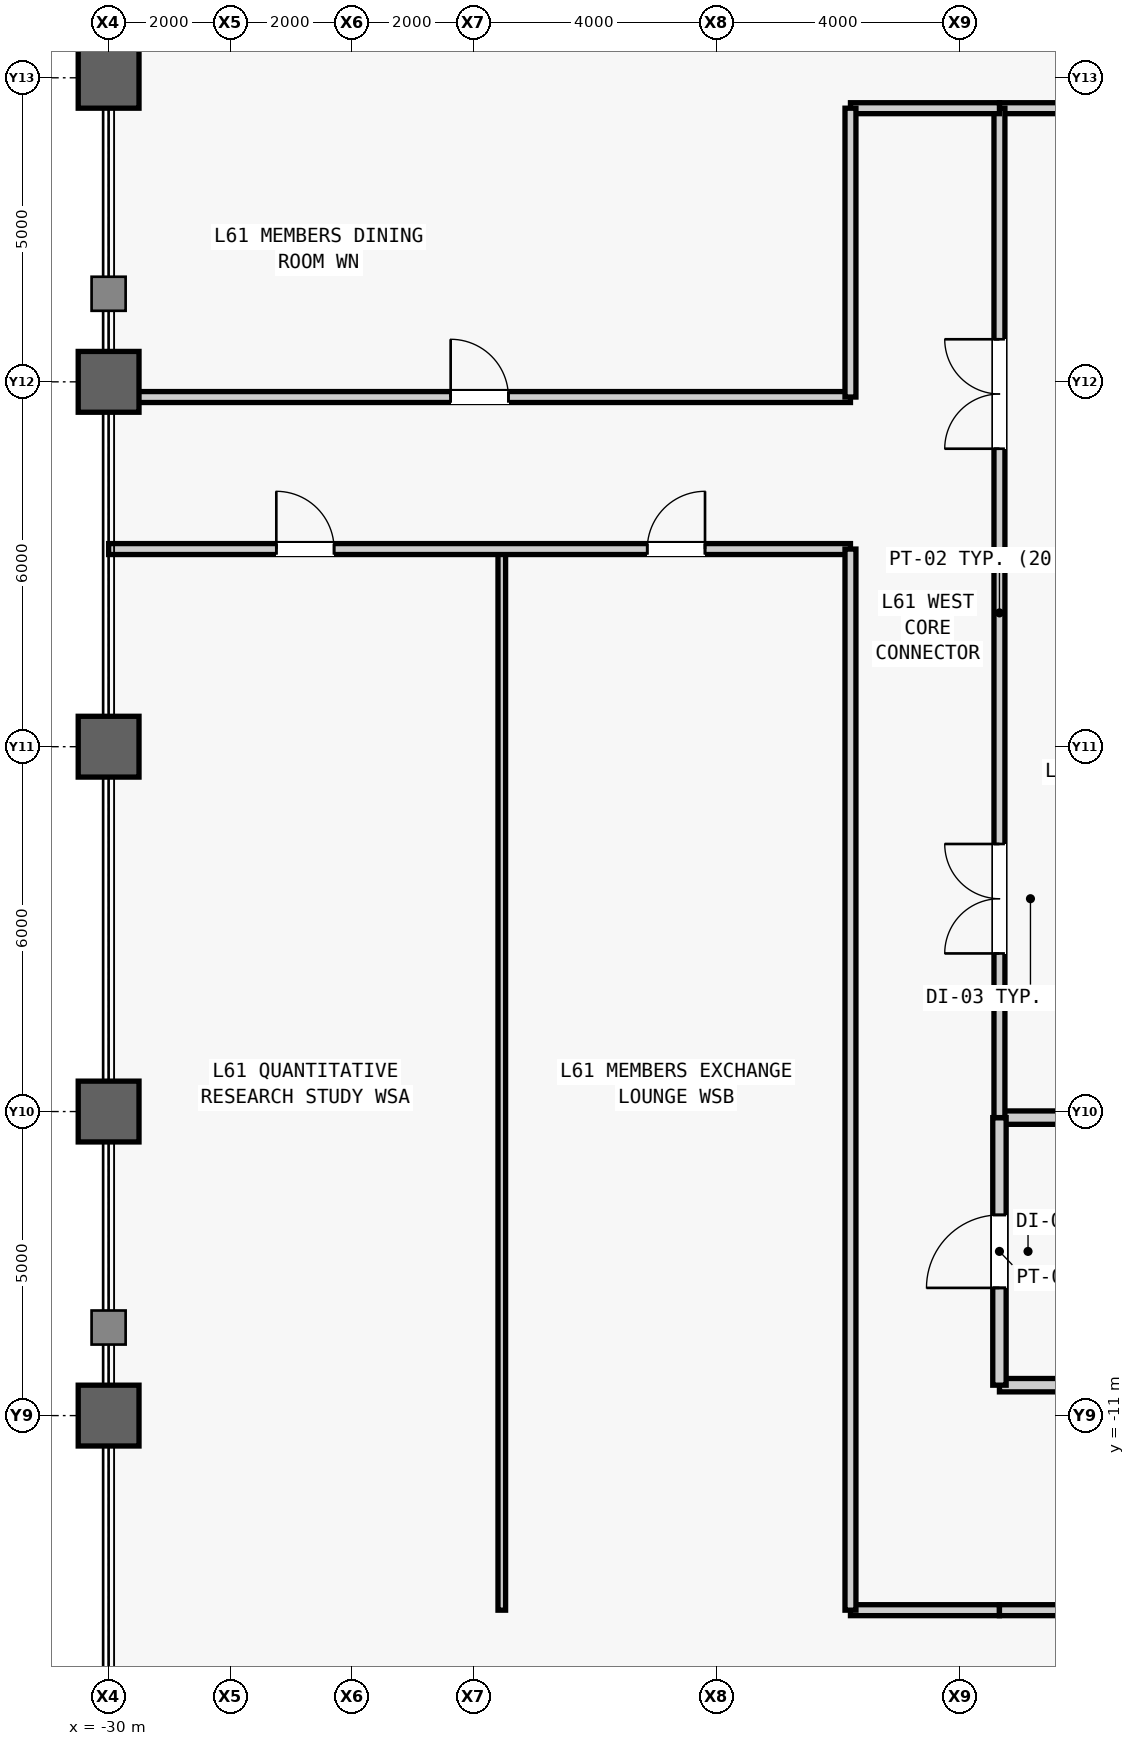
"""IFC4 building model, lengths in metres.
Left out: names, types, materials, properties, quantities, classifications, styles, units other than length and angle.
Written with IfcOpenShell. Run it as: python <this file> out.ifc"""

import sys

from ifc_helpers import new_model, si_unit, direction, frame, frame_2d, origin, origin_2d, place, context, subcontext, project, spatial, rectangle, hollow_rectangle, extrude, source, transform, mapped, element, fill, save


model = new_model("IFC4")
c1 = context("Model", 3, precision=1e-05, world=origin(), true_north=direction((0.0, 1.0)))
c2 = subcontext(c1, "Body", "Model", "MODEL_VIEW")
j1 = project(units=[si_unit("LENGTHUNIT", "METRE"), si_unit("PLANEANGLEUNIT", "RADIAN")], contexts=[c1])
p1 = place(None, origin())
s1 = spatial("IfcSite", under=j1, at=p1, CompositionType="ELEMENT")
p2 = place(p1, origin())
s2 = spatial("IfcBuilding", under=s1, at=p2, CompositionType="ELEMENT")
p3 = place(p2, frame((0.0, 0.0, 259.1)))
s3 = spatial("IfcBuildingStorey", under=s2, at=p3, CompositionType="ELEMENT", Elevation=259.1)
m1 = source(origin(), c2, "Body", "SweptSolid", [
    extrude(hollow_rectangle(XDim=1.0, YDim=1.0, WallThickness=0.055, at=origin_2d()), origin(), (0.0, 0.0, 1.0), 4.0),
])
for number, where, z_axis, x_axis in (
    (1, (-30.0, -11.0, 0.0), (0.0, 0.0, 1.0), (1.0, 0.0, 0.0)),
    (2, (-30.0, -6.0, 0.0), (0.0, 0.0, 1.0), (1.0, 0.0, 0.0)),
    (3, (-30.0, 0.0, 0.0), (0.0, 0.0, 1.0), (1.0, 0.0, 0.0)),
    (4, (-30.0, 6.0, 0.0), (0.0, 0.0, 1.0), (1.0, 0.0, 0.0)),
    (5, (-30.0, 11.0, 0.0), (0.0, 0.0, 1.0), (1.0, 0.0, 0.0)),
):
    element("IfcColumn", number, at=place(p3, frame(where, z_axis=z_axis, x_axis=x_axis)), inside=s3, PredefinedType="COLUMN", context=c2, shape_type="MappedRepresentation", body=[
        mapped(m1, transform((0.0, 0.0, 0.0), scale=1.0)),
    ])
m2 = source(origin(), c2, "Body", "SweptSolid", [
    extrude(rectangle(XDim=4.05, YDim=0.22, at=frame_2d((2.025, 0.0))), origin(), (0.0, 0.0, 1.0), 3.78),
])
p4 = place(p3, frame((-15.35, -10.5, 0.0), z_axis=(0.0, 0.0, 1.0), x_axis=(1.0, 0.0, 0.0)))
e6 = element("IfcWall", 6, at=p4, inside=s3, PredefinedType="PARTITIONING", context=c2, shape_type="MappedRepresentation", body=[
    mapped(m2, transform((0.0, 0.0, 0.0), scale=1.0)),
])
m3 = source(origin(), c2, "Body", "SweptSolid", [
    extrude(rectangle(XDim=4.05, YDim=0.22, at=frame_2d((2.025, 0.0))), origin(), (0.0, 0.0, 1.0), 3.085),
])
p5 = place(p3, frame((-15.35, -6.1, 0.0), z_axis=(0.0, 0.0, 1.0), x_axis=(1.0, 0.0, 0.0)))
e7 = element("IfcWall", 7, at=p5, inside=s3, PredefinedType="PARTITIONING", context=c2, shape_type="MappedRepresentation", body=[
    mapped(m3, transform((0.0, 0.0, 0.0), scale=1.0)),
])
m4 = source(origin(), c2, "Body", "SweptSolid", [
    extrude(rectangle(XDim=4.4, YDim=0.22, at=frame_2d((2.2, 0.0))), origin(), (0.0, 0.0, 1.0), 3.78),
])
p6 = place(p3, frame((-15.35, -10.5, 0.0), z_axis=(0.0, 0.0, 1.0), x_axis=(0.0, 1.0, 0.0)))
e8 = element("IfcWall", 8, at=p6, inside=s3, PredefinedType="PARTITIONING", context=c2, shape_type="MappedRepresentation", body=[
    mapped(m4, transform((0.0, 0.0, 0.0), scale=1.0)),
])
m5 = source(origin(), c2, "Body", "SweptSolid", [
    extrude(rectangle(XDim=1.2, YDim=2.2, at=frame_2d((0.6, 1.1))), frame((0.0, 0.12, 0.0), z_axis=(0.0, -1.0, 0.0), x_axis=(1.0, 0.0, 0.0)), (0.0, 0.0, 1.0), 0.24),
])
p7 = place(p6, frame((1.6, 0.0, 0.0)))
e9 = element("IfcOpeningElement", 9, at=p7, cuts=e8, PredefinedType="OPENING", context=c2, shape_type="MappedRepresentation", body=[
    mapped(m5, transform((0.0, 0.0, 0.0), scale=1.0)),
])
m6 = source(origin(), c2, "Body", "SweptSolid", [
    extrude(rectangle(XDim=4.05, YDim=0.18, at=frame_2d((2.025, 0.0))), origin(), (0.0, 0.0, 1.0), 3.78),
])
p8 = place(p3, frame((-15.35, 10.5, 0.0), z_axis=(0.0, 0.0, 1.0), x_axis=(1.0, 0.0, 0.0)))
e10 = element("IfcWall", 10, at=p8, inside=s3, PredefinedType="PARTITIONING", context=c2, shape_type="MappedRepresentation", body=[
    mapped(m6, transform((0.0, 0.0, 0.0), scale=1.0)),
])
m7 = source(origin(), c2, "Body", "SweptSolid", [
    extrude(rectangle(XDim=16.6, YDim=0.18, at=frame_2d((8.3, 0.0))), origin(), (0.0, 0.0, 1.0), 3.78),
])
p9 = place(p3, frame((-15.35, -6.1, 0.0), z_axis=(0.0, 0.0, 1.0), x_axis=(0.0, 1.0, 0.0)))
e11 = element("IfcWall", 11, at=p9, inside=s3, PredefinedType="PARTITIONING", context=c2, shape_type="MappedRepresentation", body=[
    mapped(m7, transform((0.0, 0.0, 0.0), scale=1.0)),
])
m8 = source(origin(), c2, "Body", "SweptSolid", [
    extrude(rectangle(XDim=1.8, YDim=2.25, at=frame_2d((0.9, 1.125))), frame((0.0, 0.1, 0.0), z_axis=(0.0, -1.0, 0.0), x_axis=(1.0, 0.0, 0.0)), (0.0, 0.0, 1.0), 0.2),
])
p10 = place(p9, frame((2.7, 0.0, 0.0)))
e12 = element("IfcOpeningElement", 12, at=p10, cuts=e11, PredefinedType="OPENING", context=c2, shape_type="MappedRepresentation", body=[
    mapped(m8, transform((0.0, 0.0, 0.0), scale=1.0)),
])
p11 = place(p9, frame((11.0, 0.0, 0.0)))
e13 = element("IfcOpeningElement", 13, at=p11, cuts=e11, PredefinedType="OPENING", context=c2, shape_type="MappedRepresentation", body=[
    mapped(m8, transform((0.0, 0.0, 0.0), scale=1.0)),
])
m9 = source(origin(), c2, "Body", "SweptSolid", [
    extrude(rectangle(XDim=2.45, YDim=0.18, at=frame_2d((1.225, 0.0))), origin(), (0.0, 0.0, 1.0), 3.78),
])
for number, where, z_axis, x_axis in (
    (14, (-17.8, 10.5, 0.0), (0.0, 0.0, 1.0), (1.0, 0.0, 0.0)),
    (15, (-17.8, -14.2, 0.0), (0.0, 0.0, 1.0), (1.0, 0.0, 0.0)),
):
    element("IfcWall", number, at=place(p3, frame(where, z_axis=z_axis, x_axis=x_axis)), inside=s3, PredefinedType="PARTITIONING", context=c2, shape_type="MappedRepresentation", body=[
        mapped(m9, transform((0.0, 0.0, 0.0), scale=1.0)),
    ])
m10 = source(origin(), c2, "Body", "SweptSolid", [
    extrude(rectangle(XDim=25.75, YDim=0.18, at=frame_2d((12.875, 0.0))), origin(), (0.0, 0.0, 1.0), 3.78),
])
p12 = place(p3, frame((-15.35, -14.2, 0.0), z_axis=(0.0, 0.0, 1.0), x_axis=(1.0, 0.0, 0.0)))
e16 = element("IfcWall", 16, at=p12, inside=s3, PredefinedType="PARTITIONING", context=c2, shape_type="MappedRepresentation", body=[
    mapped(m10, transform((0.0, 0.0, 0.0), scale=1.0)),
])
m11 = source(origin(), c2, "Body", "SweptSolid", [
    extrude(rectangle(XDim=17.45, YDim=0.125, at=frame_2d((8.725, 0.0))), origin(), (0.0, 0.0, 1.0), 3.78),
])
p13 = place(p3, frame((-23.534, -14.2, 0.0), z_axis=(0.0, 0.0, 1.0), x_axis=(0.0, 1.0, 0.0)))
e17 = element("IfcWall", 17, at=p13, inside=s3, PredefinedType="PARTITIONING", context=c2, shape_type="MappedRepresentation", body=[
    mapped(m11, transform((0.0, 0.0, 0.0), scale=1.0)),
])
m12 = source(origin(), c2, "Body", "SweptSolid", [
    extrude(rectangle(XDim=12.2, YDim=0.18, at=frame_2d((6.1, 0.0))), origin(), (0.0, 0.0, 1.0), 3.78),
])
p14 = place(p3, frame((-30.0, 3.25, 0.0), z_axis=(0.0, 0.0, 1.0), x_axis=(1.0, 0.0, 0.0)))
e18 = element("IfcWall", 18, at=p14, inside=s3, PredefinedType="PARTITIONING", context=c2, shape_type="MappedRepresentation", body=[
    mapped(m12, transform((0.0, 0.0, 0.0), scale=1.0)),
])
m13 = source(origin(), c2, "Body", "SweptSolid", [
    extrude(rectangle(XDim=0.95, YDim=2.15, at=frame_2d((0.475, 1.075))), frame((0.0, 0.1, 0.0), z_axis=(0.0, -1.0, 0.0), x_axis=(1.0, 0.0, 0.0)), (0.0, 0.0, 1.0), 0.2),
])
p15 = place(p14, frame((2.758, 0.0, 0.0)))
e19 = element("IfcOpeningElement", 19, at=p15, cuts=e18, PredefinedType="OPENING", context=c2, shape_type="MappedRepresentation", body=[
    mapped(m13, transform((0.0, 0.0, 0.0), scale=1.0)),
])
p16 = place(p14, frame((8.858, 0.0, 0.0)))
e20 = element("IfcOpeningElement", 20, at=p16, cuts=e18, PredefinedType="OPENING", context=c2, shape_type="MappedRepresentation", body=[
    mapped(m13, transform((0.0, 0.0, 0.0), scale=1.0)),
])
m14 = source(origin(), c2, "Body", "SweptSolid", [
    extrude(rectangle(XDim=17.45, YDim=0.18, at=frame_2d((8.725, 0.0))), origin(), (0.0, 0.0, 1.0), 3.78),
])
p17 = place(p3, frame((-17.8, -14.2, 0.0), z_axis=(0.0, 0.0, 1.0), x_axis=(0.0, 1.0, 0.0)))
e21 = element("IfcWall", 21, at=p17, inside=s3, PredefinedType="PARTITIONING", context=c2, shape_type="MappedRepresentation", body=[
    mapped(m14, transform((0.0, 0.0, 0.0), scale=1.0)),
])
m15 = source(origin(), c2, "Body", "SweptSolid", [
    extrude(rectangle(XDim=12.2, YDim=0.18, at=frame_2d((6.1, 0.0))), origin(), (0.0, 0.0, 1.0), 3.085),
])
p18 = place(p3, frame((-30.0, 5.75, 0.0), z_axis=(0.0, 0.0, 1.0), x_axis=(1.0, 0.0, 0.0)))
e22 = element("IfcWall", 22, at=p18, inside=s3, PredefinedType="PARTITIONING", context=c2, shape_type="MappedRepresentation", body=[
    mapped(m15, transform((0.0, 0.0, 0.0), scale=1.0)),
])
p19 = place(p18, frame((5.625, 0.0, 0.0)))
e23 = element("IfcOpeningElement", 23, at=p19, cuts=e22, PredefinedType="OPENING", context=c2, shape_type="MappedRepresentation", body=[
    mapped(m13, transform((0.0, 0.0, 0.0), scale=1.0)),
])
m16 = source(origin(), c2, "Body", "SweptSolid", [
    extrude(rectangle(XDim=4.75, YDim=0.18, at=frame_2d((2.375, 0.0))), origin(), (0.0, 0.0, 1.0), 3.78),
])
p20 = place(p3, frame((-17.8, 5.75, 0.0), z_axis=(0.0, 0.0, 1.0), x_axis=(0.0, 1.0, 0.0)))
e24 = element("IfcWall", 24, at=p20, inside=s3, PredefinedType="PARTITIONING", context=c2, shape_type="MappedRepresentation", body=[
    mapped(m16, transform((0.0, 0.0, 0.0), scale=1.0)),
])
m17 = source(origin(), c2, "Body", "SweptSolid", [
    extrude(rectangle(XDim=1.2, YDim=2.2, at=frame_2d((0.6, 1.1))), frame((0.0, 0.025, 0.0), z_axis=(0.0, -1.0, 0.0), x_axis=(1.0, 0.0, 0.0)), (0.0, 0.0, 1.0), 0.05),
])
p21 = place(p7, origin())
e25 = element("IfcDoor", 25, at=p21, inside=s3, OperationType="SINGLE_SWING_LEFT", PredefinedType="DOOR", context=c2, shape_type="MappedRepresentation", body=[
    mapped(m17, transform((0.0, 0.0, 0.0), scale=1.0)),
])
fill(e9, e25)
m18 = source(origin(), c2, "Body", "SweptSolid", [
    extrude(rectangle(XDim=1.8, YDim=2.25, at=frame_2d((0.9, 1.125))), frame((0.0, 0.025, 0.0), z_axis=(0.0, -1.0, 0.0), x_axis=(1.0, 0.0, 0.0)), (0.0, 0.0, 1.0), 0.05),
])
p22 = place(p10, origin())
e26 = element("IfcDoor", 26, at=p22, inside=s3, OperationType="SINGLE_SWING_LEFT", PredefinedType="DOOR", context=c2, shape_type="MappedRepresentation", body=[
    mapped(m18, transform((0.0, 0.0, 0.0), scale=1.0)),
])
fill(e12, e26)
p23 = place(p11, origin())
e27 = element("IfcDoor", 27, at=p23, inside=s3, OperationType="SINGLE_SWING_RIGHT", PredefinedType="DOOR", context=c2, shape_type="MappedRepresentation", body=[
    mapped(m18, transform((0.0, 0.0, 0.0), scale=1.0)),
])
fill(e13, e27)
m19 = source(origin(), c2, "Body", "SweptSolid", [
    extrude(rectangle(XDim=0.95, YDim=2.15, at=frame_2d((0.475, 1.075))), frame((0.0, 0.025, 0.0), z_axis=(0.0, -1.0, 0.0), x_axis=(1.0, 0.0, 0.0)), (0.0, 0.0, 1.0), 0.05),
])
p24 = place(p15, origin())
e28 = element("IfcDoor", 28, at=p24, inside=s3, OperationType="SINGLE_SWING_LEFT", PredefinedType="DOOR", context=c2, shape_type="MappedRepresentation", body=[
    mapped(m19, transform((0.0, 0.0, 0.0), scale=1.0)),
])
fill(e19, e28)
p25 = place(p16, origin())
e29 = element("IfcDoor", 29, at=p25, inside=s3, OperationType="SINGLE_SWING_RIGHT", PredefinedType="DOOR", context=c2, shape_type="MappedRepresentation", body=[
    mapped(m19, transform((0.0, 0.0, 0.0), scale=1.0)),
])
fill(e20, e29)
p26 = place(p19, origin())
e30 = element("IfcDoor", 30, at=p26, inside=s3, OperationType="SINGLE_SWING_LEFT", PredefinedType="DOOR", context=c2, shape_type="MappedRepresentation", body=[
    mapped(m19, transform((0.0, 0.0, 0.0), scale=1.0)),
])
fill(e23, e30)
save(model, sys.argv[1])
